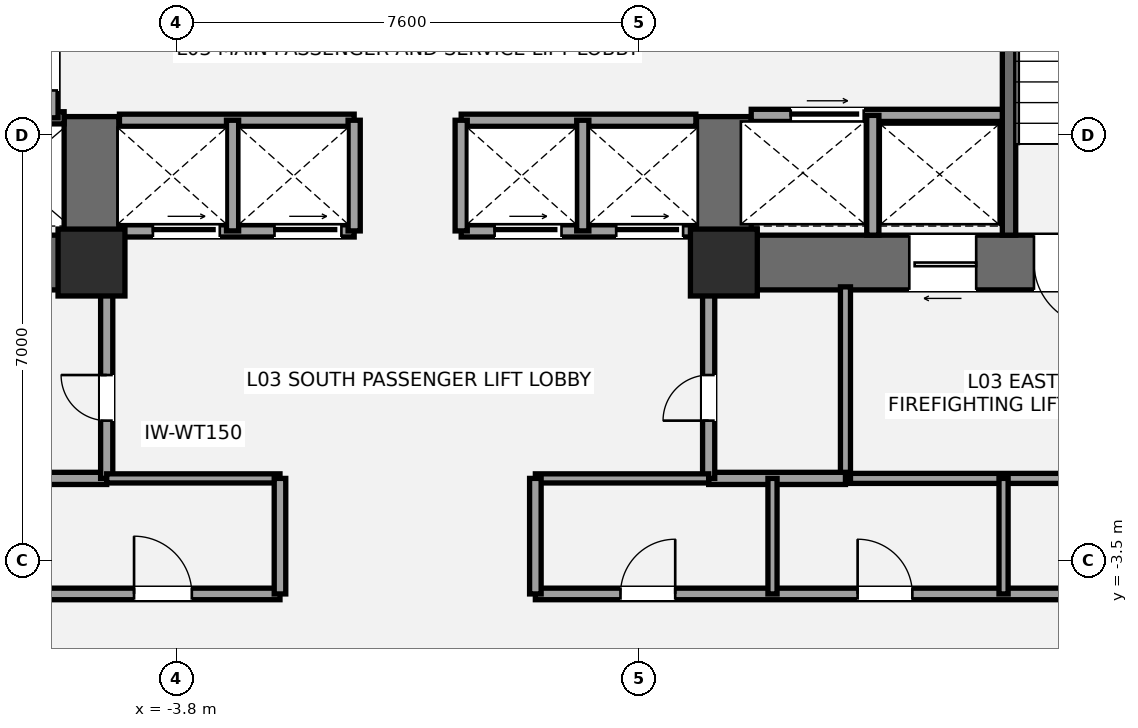
"""IFC4 building model, lengths in metres.
Left out: names, types, materials, properties, quantities, classifications, styles, units other than length and angle.
Written with IfcOpenShell. Run it as: python <this file> out.ifc"""

import sys

from ifc_helpers import new_model, si_unit, direction, frame, frame_2d, origin, origin_2d, place, context, subcontext, project, spatial, rectangle, extrude, element, fill, save


model = new_model("IFC4")
c1 = context("Model", 3, precision=1e-05, world=origin(), true_north=direction((0.0, 1.0)))
c2 = subcontext(c1, "Body", "Model", "MODEL_VIEW")
j1 = project(units=[si_unit("LENGTHUNIT", "METRE"), si_unit("PLANEANGLEUNIT", "RADIAN")], contexts=[c1])
p1 = place(None, origin())
s1 = spatial("IfcSite", under=j1, at=p1, CompositionType="ELEMENT")
p2 = place(p1, origin())
s2 = spatial("IfcBuilding", under=s1, at=p2, CompositionType="ELEMENT")
p3 = place(p2, frame((0.0, 0.0, 14.4)))
s3 = spatial("IfcBuildingStorey", under=s2, at=p3, CompositionType="ELEMENT", Elevation=14.4)
p4 = place(p3, frame((-4.75, 1.4, 0.0), z_axis=(0.0, 0.0, 1.0), x_axis=(-1.0, 0.0, 0.0)))
e1 = element("IfcWall", 1, at=p4, inside=s3, PredefinedType="SHEAR", context=c2, shape_type="SweptSolid", body=[
    extrude(rectangle(XDim=9.3, YDim=0.9, at=frame_2d((4.65, 0.0))), origin(), (0.0, 0.0, 1.0), 4.2),
])
p5 = place(p4, frame((5.55, 0.0, 0.0)))
e2 = element("IfcOpeningElement", 2, at=p5, cuts=e1, PredefinedType="OPENING", context=c2, shape_type="SweptSolid", body=[
    extrude(rectangle(XDim=1.05, YDim=2.15, at=frame_2d((0.525, 1.075))), frame((0.0, 0.46, 0.0), z_axis=(0.0, -1.0, 0.0), x_axis=(1.0, 0.0, 0.0)), (0.0, 0.0, 1.0), 0.92),
])
p6 = place(p4, frame((3.88, 0.0, 0.0)))
e3 = element("IfcOpeningElement", 3, at=p6, cuts=e1, PredefinedType="OPENING", context=c2, shape_type="SweptSolid", body=[
    extrude(rectangle(XDim=1.1, YDim=2.2, at=frame_2d((0.55, 1.1))), frame((0.0, 0.46, 0.0), z_axis=(0.0, -1.0, 0.0), x_axis=(1.0, 0.0, 0.0)), (0.0, 0.0, 1.0), 0.92),
])
p7 = place(p3, frame((-5.2, 0.95, 0.0), z_axis=(0.0, 0.0, 1.0), x_axis=(0.0, 1.0, 0.0)))
e4 = element("IfcWall", 4, at=p7, inside=s3, PredefinedType="SHEAR", context=c2, shape_type="SweptSolid", body=[
    extrude(rectangle(XDim=2.85, YDim=0.9, at=frame_2d((1.425, 0.0))), origin(), (0.0, 0.0, 1.0), 4.2),
])
p8 = place(p3, frame((14.05, 1.4, 0.0), z_axis=(0.0, 0.0, 1.0), x_axis=(-1.0, 0.0, 0.0)))
e5 = element("IfcWall", 5, at=p8, inside=s3, PredefinedType="SHEAR", context=c2, shape_type="SweptSolid", body=[
    extrude(rectangle(XDim=9.3, YDim=0.9, at=frame_2d((4.65, 0.0))), origin(), (0.0, 0.0, 1.0), 4.2),
])
p9 = place(p8, frame((2.7, 0.0, 0.0)))
e6 = element("IfcOpeningElement", 6, at=p9, cuts=e5, PredefinedType="OPENING", context=c2, shape_type="SweptSolid", body=[
    extrude(rectangle(XDim=1.05, YDim=2.15, at=frame_2d((0.525, 1.075))), frame((0.0, 0.46, 0.0), z_axis=(0.0, -1.0, 0.0), x_axis=(1.0, 0.0, 0.0)), (0.0, 0.0, 1.0), 0.92),
])
p10 = place(p8, frame((4.7, 0.0, 0.0)))
e7 = element("IfcOpeningElement", 7, at=p10, cuts=e5, PredefinedType="OPENING", context=c2, shape_type="SweptSolid", body=[
    extrude(rectangle(XDim=1.1, YDim=2.2, at=frame_2d((0.55, 1.1))), frame((0.0, 0.46, 0.0), z_axis=(0.0, -1.0, 0.0), x_axis=(1.0, 0.0, 0.0)), (0.0, 0.0, 1.0), 0.92),
])
p11 = place(p3, frame((5.2, 0.95, 0.0), z_axis=(0.0, 0.0, 1.0), x_axis=(0.0, 1.0, 0.0)))
e8 = element("IfcWall", 8, at=p11, inside=s3, PredefinedType="SHEAR", context=c2, shape_type="SweptSolid", body=[
    extrude(rectangle(XDim=2.85, YDim=0.9, at=frame_2d((1.425, 0.0))), origin(), (0.0, 0.0, 1.0), 4.2),
])
p12 = place(p3, frame((9.89, 1.85, 0.0), z_axis=(0.0, 0.0, 1.0), x_axis=(0.0, 1.0, 0.0)))
e9 = element("IfcWall", 9, at=p12, inside=s3, PredefinedType="SHEAR", context=c2, shape_type="SweptSolid", body=[
    extrude(rectangle(XDim=7.15, YDim=0.22, at=frame_2d((3.575, 0.0))), origin(), (0.0, 0.0, 1.0), 4.2),
])
for number, where, z_axis, x_axis in (
    (10, (-5.2, 1.4, 0.0), (0.0, 0.0, 1.0), (1.0, 0.0, 0.0)),
    (11, (5.2, 1.4, 0.0), (0.0, 0.0, 1.0), (1.0, 0.0, 0.0)),
):
    element("IfcColumn", number, at=place(p3, frame(where, z_axis=z_axis, x_axis=x_axis)), inside=s3, PredefinedType="COLUMN", context=c2, shape_type="SweptSolid", body=[
        extrude(rectangle(XDim=1.1, YDim=1.1, at=origin_2d()), origin(), (0.0, 0.0, 1.0), 4.2),
    ])
p13 = place(p3, frame((-7.2, -2.15, 0.0), z_axis=(0.0, 0.0, 1.0), x_axis=(1.0, 0.0, 0.0)))
e12 = element("IfcWall", 12, at=p13, inside=s3, PredefinedType="SOLIDWALL", context=c2, shape_type="SweptSolid", body=[
    extrude(rectangle(XDim=2.25, YDim=0.2, at=frame_2d((1.125, 0.0))), origin(), (0.0, 0.0, 1.0), 3.98),
])
p14 = place(p3, frame((-4.95, -2.15, 0.0), z_axis=(0.0, 0.0, 1.0), x_axis=(0.0, 1.0, 0.0)))
e13 = element("IfcWall", 13, at=p14, inside=s3, PredefinedType="SOLIDWALL", context=c2, shape_type="SweptSolid", body=[
    extrude(rectangle(XDim=3.15, YDim=0.2, at=frame_2d((1.575, 0.0))), origin(), (0.0, 0.0, 1.0), 3.348),
])
p15 = place(p14, frame((0.95, 0.0, 0.0)))
e14 = element("IfcOpeningElement", 14, at=p15, cuts=e13, PredefinedType="OPENING", context=c2, shape_type="SweptSolid", body=[
    extrude(rectangle(XDim=0.75, YDim=2.1, at=frame_2d((0.375, 1.05))), frame((0.0, 0.11, 0.0), z_axis=(0.0, -1.0, 0.0), x_axis=(1.0, 0.0, 0.0)), (0.0, 0.0, 1.0), 0.22),
])
p16 = place(p3, frame((7.2, -2.15, 0.0), z_axis=(0.0, 0.0, 1.0), x_axis=(1.0, 0.0, 0.0)))
e15 = element("IfcWall", 15, at=p16, inside=s3, PredefinedType="PARTITIONING", context=c2, shape_type="SweptSolid", body=[
    extrude(rectangle(XDim=6.25, YDim=0.165, at=frame_2d((3.125, 0.0))), origin(), (0.0, 0.0, 1.0), 3.98),
])
p17 = place(p3, frame((7.2, -2.15, 0.0), z_axis=(0.0, 0.0, 1.0), x_axis=(0.0, 1.0, 0.0)))
e16 = element("IfcWall", 16, at=p17, inside=s3, PredefinedType="PARTITIONING", context=c2, shape_type="SweptSolid", body=[
    extrude(rectangle(XDim=3.15, YDim=0.165, at=frame_2d((1.575, 0.0))), origin(), (0.0, 0.0, 1.0), 3.98),
])
p18 = place(p3, frame((4.95, -2.15, 0.0), z_axis=(0.0, 0.0, 1.0), x_axis=(1.0, 0.0, 0.0)))
e17 = element("IfcWall", 17, at=p18, inside=s3, PredefinedType="SOLIDWALL", context=c2, shape_type="SweptSolid", body=[
    extrude(rectangle(XDim=2.25, YDim=0.2, at=frame_2d((1.125, 0.0))), origin(), (0.0, 0.0, 1.0), 3.98),
])
p19 = place(p3, frame((4.95, -2.15, 0.0), z_axis=(0.0, 0.0, 1.0), x_axis=(0.0, 1.0, 0.0)))
e18 = element("IfcWall", 18, at=p19, inside=s3, PredefinedType="SOLIDWALL", context=c2, shape_type="SweptSolid", body=[
    extrude(rectangle(XDim=3.15, YDim=0.2, at=frame_2d((1.575, 0.0))), origin(), (0.0, 0.0, 1.0), 3.348),
])
p20 = place(p19, frame((0.95, 0.0, 0.0)))
e19 = element("IfcOpeningElement", 19, at=p20, cuts=e18, PredefinedType="OPENING", context=c2, shape_type="SweptSolid", body=[
    extrude(rectangle(XDim=0.75, YDim=2.1, at=frame_2d((0.375, 1.05))), frame((0.0, 0.11, 0.0), z_axis=(0.0, -1.0, 0.0), x_axis=(1.0, 0.0, 0.0)), (0.0, 0.0, 1.0), 0.22),
])
p21 = place(p3, frame((-9.78, 3.78, 0.0), z_axis=(0.0, 0.0, 1.0), x_axis=(1.0, 0.0, 0.0)))
e20 = element("IfcWall", 20, at=p21, inside=s3, PredefinedType="SOLIDWALL", context=c2, shape_type="SweptSolid", body=[
    extrude(rectangle(XDim=4.13, YDim=0.2, at=frame_2d((2.065, 0.0))), origin(), (0.0, 0.0, 1.0), 3.98),
])
p22 = place(p3, frame((-5.85, 3.78, 0.0), z_axis=(0.0, 0.0, 1.0), x_axis=(0.0, 1.0, 0.0)))
e21 = element("IfcWall", 21, at=p22, inside=s3, PredefinedType="SOLIDWALL", context=c2, shape_type="SweptSolid", body=[
    extrude(rectangle(XDim=1.69, YDim=0.2, at=frame_2d((0.845, 0.0))), origin(), (0.0, 0.0, 1.0), 3.98),
])
p23 = place(p22, frame((0.45, 0.0, 0.0)))
e22 = element("IfcOpeningElement", 22, at=p23, cuts=e21, PredefinedType="OPENING", context=c2, shape_type="SweptSolid", body=[
    extrude(rectangle(XDim=0.75, YDim=2.1, at=frame_2d((0.375, 1.05))), frame((0.0, 0.11, 0.0), z_axis=(0.0, -1.0, 0.0), x_axis=(1.0, 0.0, 0.0)), (0.0, 0.0, 1.0), 0.22),
])
p24 = place(p3, frame((5.65, 3.82, 0.0), z_axis=(0.0, 0.0, 1.0), x_axis=(1.0, 0.0, 0.0)))
e23 = element("IfcWall", 23, at=p24, inside=s3, PredefinedType="SOLIDWALL", context=c2, shape_type="SweptSolid", body=[
    extrude(rectangle(XDim=4.13, YDim=0.2, at=frame_2d((2.065, 0.0))), origin(), (0.0, 0.0, 1.0), 3.98),
])
p25 = place(p24, frame((0.65, 0.0, 0.0)))
e24 = element("IfcOpeningElement", 24, at=p25, cuts=e23, PredefinedType="OPENING", context=c2, shape_type="SweptSolid", body=[
    extrude(rectangle(XDim=1.2, YDim=2.2, at=frame_2d((0.6, 1.1))), frame((0.0, 0.11, 0.0), z_axis=(0.0, -1.0, 0.0), x_axis=(1.0, 0.0, 0.0)), (0.0, 0.0, 1.0), 0.22),
])
p26 = place(p3, frame((7.65, 1.85, 0.0), z_axis=(0.0, 0.0, 1.0), x_axis=(0.0, 1.0, 0.0)))
e25 = element("IfcWall", 25, at=p26, inside=s3, PredefinedType="SOLIDWALL", context=c2, shape_type="SweptSolid", body=[
    extrude(rectangle(XDim=1.97, YDim=0.2, at=frame_2d((0.985, 0.0))), origin(), (0.0, 0.0, 1.0), 3.98),
])
p27 = place(p3, frame((-4.74, 1.92, 0.0), z_axis=(0.0, 0.0, 1.0), x_axis=(1.0, 0.0, 0.0)))
e26 = element("IfcWall", 26, at=p27, inside=s3, PredefinedType="SOLIDWALL", context=c2, shape_type="SweptSolid", body=[
    extrude(rectangle(XDim=3.86, YDim=0.2, at=frame_2d((1.93, 0.0))), origin(), (0.0, 0.0, 1.0), 2.97),
])
p28 = place(p27, frame((0.55, 0.0, 0.0)))
e27 = element("IfcOpeningElement", 27, at=p28, cuts=e26, PredefinedType="OPENING", context=c2, shape_type="SweptSolid", body=[
    extrude(rectangle(XDim=1.1, YDim=2.2, at=frame_2d((0.55, 1.1))), frame((0.0, 0.11, 0.0), z_axis=(0.0, -1.0, 0.0), x_axis=(1.0, 0.0, 0.0)), (0.0, 0.0, 1.0), 0.22),
])
p29 = place(p27, frame((2.55, 0.0, 0.0)))
e28 = element("IfcOpeningElement", 28, at=p29, cuts=e26, PredefinedType="OPENING", context=c2, shape_type="SweptSolid", body=[
    extrude(rectangle(XDim=1.1, YDim=2.2, at=frame_2d((0.55, 1.1))), frame((0.0, 0.11, 0.0), z_axis=(0.0, -1.0, 0.0), x_axis=(1.0, 0.0, 0.0)), (0.0, 0.0, 1.0), 0.22),
])
p30 = place(p3, frame((0.88, 1.92, 0.0), z_axis=(0.0, 0.0, 1.0), x_axis=(1.0, 0.0, 0.0)))
e29 = element("IfcWall", 29, at=p30, inside=s3, PredefinedType="SOLIDWALL", context=c2, shape_type="SweptSolid", body=[
    extrude(rectangle(XDim=3.86, YDim=0.2, at=frame_2d((1.93, 0.0))), origin(), (0.0, 0.0, 1.0), 2.97),
])
p31 = place(p30, frame((0.55, 0.0, 0.0)))
e30 = element("IfcOpeningElement", 30, at=p31, cuts=e29, PredefinedType="OPENING", context=c2, shape_type="SweptSolid", body=[
    extrude(rectangle(XDim=1.1, YDim=2.2, at=frame_2d((0.55, 1.1))), frame((0.0, 0.11, 0.0), z_axis=(0.0, -1.0, 0.0), x_axis=(1.0, 0.0, 0.0)), (0.0, 0.0, 1.0), 0.22),
])
p32 = place(p30, frame((2.55, 0.0, 0.0)))
e31 = element("IfcOpeningElement", 31, at=p32, cuts=e29, PredefinedType="OPENING", context=c2, shape_type="SweptSolid", body=[
    extrude(rectangle(XDim=1.1, YDim=2.2, at=frame_2d((0.55, 1.1))), frame((0.0, 0.11, 0.0), z_axis=(0.0, -1.0, 0.0), x_axis=(1.0, 0.0, 0.0)), (0.0, 0.0, 1.0), 0.22),
])
for number, where, z_axis, x_axis in (
    (32, (-4.74, 3.74, 0.0), (0.0, 0.0, 1.0), (1.0, 0.0, 0.0)),
    (33, (0.88, 3.74, 0.0), (0.0, 0.0, 1.0), (1.0, 0.0, 0.0)),
):
    element("IfcWall", number, at=place(p3, frame(where, z_axis=z_axis, x_axis=x_axis)), inside=s3, PredefinedType="SOLIDWALL", context=c2, shape_type="SweptSolid", body=[
        extrude(rectangle(XDim=3.86, YDim=0.2, at=frame_2d((1.93, 0.0))), origin(), (0.0, 0.0, 1.0), 3.98),
    ])
for number, where, z_axis, x_axis in (
    (34, (-2.88, 1.92, 0.0), (0.0, 0.0, 1.0), (0.0, 1.0, 0.0)),
    (35, (2.88, 1.92, 0.0), (0.0, 0.0, 1.0), (0.0, 1.0, 0.0)),
    (36, (-0.88, 1.92, 0.0), (0.0, 0.0, 1.0), (0.0, 1.0, 0.0)),
    (37, (0.88, 1.92, 0.0), (0.0, 0.0, 1.0), (0.0, 1.0, 0.0)),
):
    element("IfcWall", number, at=place(p3, frame(where, z_axis=z_axis, x_axis=x_axis)), inside=s3, PredefinedType="SOLIDWALL", context=c2, shape_type="SweptSolid", body=[
        extrude(rectangle(XDim=1.82, YDim=0.2, at=frame_2d((0.91, 0.0))), origin(), (0.0, 0.0, 1.0), 3.98),
    ])
p33 = place(p3, frame((-13.45, -4.05, 0.0), z_axis=(0.0, 0.0, 1.0), x_axis=(1.0, 0.0, 0.0)))
e38 = element("IfcWall", 38, at=p33, inside=s3, PredefinedType="PLUMBINGWALL", context=c2, shape_type="SweptSolid", body=[
    extrude(rectangle(XDim=11.35, YDim=0.19, at=frame_2d((5.675, 0.0))), origin(), (0.0, 0.0, 1.0), 3.507),
])
p34 = place(p33, frame((1.25, 0.0, 0.0)))
e39 = element("IfcOpeningElement", 39, at=p34, cuts=e38, PredefinedType="OPENING", context=c2, shape_type="SweptSolid", body=[
    extrude(rectangle(XDim=0.85, YDim=2.1, at=frame_2d((0.425, 1.05))), frame((0.0, 0.105, 0.0), z_axis=(0.0, -1.0, 0.0), x_axis=(1.0, 0.0, 0.0)), (0.0, 0.0, 1.0), 0.21),
])
p35 = place(p33, frame((5.1, 0.0, 0.0)))
e40 = element("IfcOpeningElement", 40, at=p35, cuts=e38, PredefinedType="OPENING", context=c2, shape_type="SweptSolid", body=[
    extrude(rectangle(XDim=0.85, YDim=2.1, at=frame_2d((0.425, 1.05))), frame((0.0, 0.105, 0.0), z_axis=(0.0, -1.0, 0.0), x_axis=(1.0, 0.0, 0.0)), (0.0, 0.0, 1.0), 0.21),
])
p36 = place(p33, frame((8.95, 0.0, 0.0)))
e41 = element("IfcOpeningElement", 41, at=p36, cuts=e38, PredefinedType="OPENING", context=c2, shape_type="SweptSolid", body=[
    extrude(rectangle(XDim=0.95, YDim=2.15, at=frame_2d((0.475, 1.075))), frame((0.0, 0.105, 0.0), z_axis=(0.0, -1.0, 0.0), x_axis=(1.0, 0.0, 0.0)), (0.0, 0.0, 1.0), 0.21),
])
p37 = place(p3, frame((-4.95, -2.15, 0.0), z_axis=(0.0, 0.0, 1.0), x_axis=(1.0, 0.0, 0.0)))
e42 = element("IfcWall", 42, at=p37, inside=s3, PredefinedType="PLUMBINGWALL", context=c2, shape_type="SweptSolid", body=[
    extrude(rectangle(XDim=2.85, YDim=0.15, at=frame_2d((1.425, 0.0))), origin(), (0.0, 0.0, 1.0), 3.98),
])
p38 = place(p3, frame((-2.1, -4.05, 0.0), z_axis=(0.0, 0.0, 1.0), x_axis=(0.0, 1.0, 0.0)))
e43 = element("IfcWall", 43, at=p38, inside=s3, PredefinedType="PLUMBINGWALL", context=c2, shape_type="SweptSolid", body=[
    extrude(rectangle(XDim=1.9, YDim=0.19, at=frame_2d((0.95, 0.0))), origin(), (0.0, 0.0, 1.0), 3.98),
])
p39 = place(p3, frame((2.1, -4.05, 0.0), z_axis=(0.0, 0.0, 1.0), x_axis=(1.0, 0.0, 0.0)))
e44 = element("IfcWall", 44, at=p39, inside=s3, PredefinedType="PLUMBINGWALL", context=c2, shape_type="SweptSolid", body=[
    extrude(rectangle(XDim=11.35, YDim=0.19, at=frame_2d((5.675, 0.0))), origin(), (0.0, 0.0, 1.0), 3.507),
])
p40 = place(p39, frame((1.4, 0.0, 0.0)))
e45 = element("IfcOpeningElement", 45, at=p40, cuts=e44, PredefinedType="OPENING", context=c2, shape_type="SweptSolid", body=[
    extrude(rectangle(XDim=0.9, YDim=2.1, at=frame_2d((0.45, 1.05))), frame((0.0, 0.105, 0.0), z_axis=(0.0, -1.0, 0.0), x_axis=(1.0, 0.0, 0.0)), (0.0, 0.0, 1.0), 0.21),
])
p41 = place(p39, frame((5.3, 0.0, 0.0)))
e46 = element("IfcOpeningElement", 46, at=p41, cuts=e44, PredefinedType="OPENING", context=c2, shape_type="SweptSolid", body=[
    extrude(rectangle(XDim=0.9, YDim=2.1, at=frame_2d((0.45, 1.05))), frame((0.0, 0.105, 0.0), z_axis=(0.0, -1.0, 0.0), x_axis=(1.0, 0.0, 0.0)), (0.0, 0.0, 1.0), 0.21),
])
p42 = place(p39, frame((9.1, 0.0, 0.0)))
e47 = element("IfcOpeningElement", 47, at=p42, cuts=e44, PredefinedType="OPENING", context=c2, shape_type="SweptSolid", body=[
    extrude(rectangle(XDim=0.9, YDim=2.1, at=frame_2d((0.45, 1.05))), frame((0.0, 0.105, 0.0), z_axis=(0.0, -1.0, 0.0), x_axis=(1.0, 0.0, 0.0)), (0.0, 0.0, 1.0), 0.21),
])
p43 = place(p3, frame((2.1, -2.15, 0.0), z_axis=(0.0, 0.0, 1.0), x_axis=(1.0, 0.0, 0.0)))
e48 = element("IfcWall", 48, at=p43, inside=s3, PredefinedType="PLUMBINGWALL", context=c2, shape_type="SweptSolid", body=[
    extrude(rectangle(XDim=2.85, YDim=0.15, at=frame_2d((1.425, 0.0))), origin(), (0.0, 0.0, 1.0), 3.98),
])
p44 = place(p3, frame((2.1, -4.05, 0.0), z_axis=(0.0, 0.0, 1.0), x_axis=(0.0, 1.0, 0.0)))
e49 = element("IfcWall", 49, at=p44, inside=s3, PredefinedType="PLUMBINGWALL", context=c2, shape_type="SweptSolid", body=[
    extrude(rectangle(XDim=1.9, YDim=0.19, at=frame_2d((0.95, 0.0))), origin(), (0.0, 0.0, 1.0), 3.98),
])
p45 = place(p3, frame((6.0, -4.05, 0.0), z_axis=(0.0, 0.0, 1.0), x_axis=(0.0, 1.0, 0.0)))
e50 = element("IfcWall", 50, at=p45, inside=s3, PredefinedType="PLUMBINGWALL", context=c2, shape_type="SweptSolid", body=[
    extrude(rectangle(XDim=1.9, YDim=0.15, at=frame_2d((0.95, 0.0))), origin(), (0.0, 0.0, 1.0), 3.348),
])
p46 = place(p3, frame((9.8, -4.05, 0.0), z_axis=(0.0, 0.0, 1.0), x_axis=(0.0, 1.0, 0.0)))
e51 = element("IfcWall", 51, at=p46, inside=s3, PredefinedType="PLUMBINGWALL", context=c2, shape_type="SweptSolid", body=[
    extrude(rectangle(XDim=1.9, YDim=0.15, at=frame_2d((0.95, 0.0))), origin(), (0.0, 0.0, 1.0), 3.98),
])
p47 = place(p9, origin())
e52 = element("IfcDoor", 52, at=p47, inside=s3, OperationType="SINGLE_SWING_LEFT", PredefinedType="DOOR", context=c2, shape_type="SweptSolid", body=[
    extrude(rectangle(XDim=1.05, YDim=2.15, at=frame_2d((0.525, 1.075))), frame((0.0, 0.025, 0.0), z_axis=(0.0, -1.0, 0.0), x_axis=(1.0, 0.0, 0.0)), (0.0, 0.0, 1.0), 0.05),
])
fill(e6, e52)
p48 = place(p15, origin())
e53 = element("IfcDoor", 53, at=p48, inside=s3, OperationType="SINGLE_SWING_RIGHT", PredefinedType="DOOR", context=c2, shape_type="SweptSolid", body=[
    extrude(rectangle(XDim=0.75, YDim=2.1, at=frame_2d((0.375, 1.05))), frame((0.0, 0.025, 0.0), z_axis=(0.0, -1.0, 0.0), x_axis=(1.0, 0.0, 0.0)), (0.0, 0.0, 1.0), 0.05),
])
fill(e14, e53)
p49 = place(p20, origin())
e54 = element("IfcDoor", 54, at=p49, inside=s3, OperationType="SINGLE_SWING_LEFT", PredefinedType="DOOR", context=c2, shape_type="SweptSolid", body=[
    extrude(rectangle(XDim=0.75, YDim=2.1, at=frame_2d((0.375, 1.05))), frame((0.0, 0.025, 0.0), z_axis=(0.0, -1.0, 0.0), x_axis=(1.0, 0.0, 0.0)), (0.0, 0.0, 1.0), 0.05),
])
fill(e19, e54)
p50 = place(p23, origin())
e55 = element("IfcDoor", 55, at=p50, inside=s3, OperationType="SINGLE_SWING_RIGHT", PredefinedType="DOOR", context=c2, shape_type="SweptSolid", body=[
    extrude(rectangle(XDim=0.75, YDim=2.1, at=frame_2d((0.375, 1.05))), frame((0.0, 0.025, 0.0), z_axis=(0.0, -1.0, 0.0), x_axis=(1.0, 0.0, 0.0)), (0.0, 0.0, 1.0), 0.05),
])
fill(e22, e55)
p51 = place(p10, origin())
e56 = element("IfcDoor", 56, at=p51, inside=s3, OperationType="SLIDING_TO_LEFT", PredefinedType="DOOR", context=c2, shape_type="SweptSolid", body=[
    extrude(rectangle(XDim=1.1, YDim=2.2, at=frame_2d((0.55, 1.1))), frame((0.0, 0.025, 0.0), z_axis=(0.0, -1.0, 0.0), x_axis=(1.0, 0.0, 0.0)), (0.0, 0.0, 1.0), 0.05),
])
fill(e7, e56)
p52 = place(p25, origin())
e57 = element("IfcDoor", 57, at=p52, inside=s3, OperationType="SLIDING_TO_RIGHT", PredefinedType="DOOR", context=c2, shape_type="SweptSolid", body=[
    extrude(rectangle(XDim=1.2, YDim=2.2, at=frame_2d((0.6, 1.1))), frame((0.0, 0.025, 0.0), z_axis=(0.0, -1.0, 0.0), x_axis=(1.0, 0.0, 0.0)), (0.0, 0.0, 1.0), 0.05),
])
fill(e24, e57)
p53 = place(p28, origin())
e58 = element("IfcDoor", 58, at=p53, inside=s3, OperationType="SLIDING_TO_LEFT", PredefinedType="DOOR", context=c2, shape_type="SweptSolid", body=[
    extrude(rectangle(XDim=1.1, YDim=2.2, at=frame_2d((0.55, 1.1))), frame((0.0, 0.025, 0.0), z_axis=(0.0, -1.0, 0.0), x_axis=(1.0, 0.0, 0.0)), (0.0, 0.0, 1.0), 0.05),
])
fill(e27, e58)
p54 = place(p29, origin())
e59 = element("IfcDoor", 59, at=p54, inside=s3, OperationType="SLIDING_TO_LEFT", PredefinedType="DOOR", context=c2, shape_type="SweptSolid", body=[
    extrude(rectangle(XDim=1.1, YDim=2.2, at=frame_2d((0.55, 1.1))), frame((0.0, 0.025, 0.0), z_axis=(0.0, -1.0, 0.0), x_axis=(1.0, 0.0, 0.0)), (0.0, 0.0, 1.0), 0.05),
])
fill(e28, e59)
p55 = place(p31, origin())
e60 = element("IfcDoor", 60, at=p55, inside=s3, OperationType="SLIDING_TO_LEFT", PredefinedType="DOOR", context=c2, shape_type="SweptSolid", body=[
    extrude(rectangle(XDim=1.1, YDim=2.2, at=frame_2d((0.55, 1.1))), frame((0.0, 0.025, 0.0), z_axis=(0.0, -1.0, 0.0), x_axis=(1.0, 0.0, 0.0)), (0.0, 0.0, 1.0), 0.05),
])
fill(e30, e60)
p56 = place(p32, origin())
e61 = element("IfcDoor", 61, at=p56, inside=s3, OperationType="SLIDING_TO_LEFT", PredefinedType="DOOR", context=c2, shape_type="SweptSolid", body=[
    extrude(rectangle(XDim=1.1, YDim=2.2, at=frame_2d((0.55, 1.1))), frame((0.0, 0.025, 0.0), z_axis=(0.0, -1.0, 0.0), x_axis=(1.0, 0.0, 0.0)), (0.0, 0.0, 1.0), 0.05),
])
fill(e31, e61)
p57 = place(p36, origin())
e62 = element("IfcDoor", 62, at=p57, inside=s3, OperationType="SINGLE_SWING_LEFT", PredefinedType="DOOR", context=c2, shape_type="SweptSolid", body=[
    extrude(rectangle(XDim=0.95, YDim=2.15, at=frame_2d((0.475, 1.075))), frame((0.0, 0.025, 0.0), z_axis=(0.0, -1.0, 0.0), x_axis=(1.0, 0.0, 0.0)), (0.0, 0.0, 1.0), 0.05),
])
fill(e41, e62)
p58 = place(p40, origin())
e63 = element("IfcDoor", 63, at=p58, inside=s3, OperationType="SINGLE_SWING_RIGHT", PredefinedType="DOOR", context=c2, shape_type="SweptSolid", body=[
    extrude(rectangle(XDim=0.9, YDim=2.1, at=frame_2d((0.45, 1.05))), frame((0.0, 0.025, 0.0), z_axis=(0.0, -1.0, 0.0), x_axis=(1.0, 0.0, 0.0)), (0.0, 0.0, 1.0), 0.05),
])
fill(e45, e63)
p59 = place(p41, origin())
e64 = element("IfcDoor", 64, at=p59, inside=s3, OperationType="SINGLE_SWING_LEFT", PredefinedType="DOOR", context=c2, shape_type="SweptSolid", body=[
    extrude(rectangle(XDim=0.9, YDim=2.1, at=frame_2d((0.45, 1.05))), frame((0.0, 0.025, 0.0), z_axis=(0.0, -1.0, 0.0), x_axis=(1.0, 0.0, 0.0)), (0.0, 0.0, 1.0), 0.05),
])
fill(e46, e64)
save(model, sys.argv[1])
